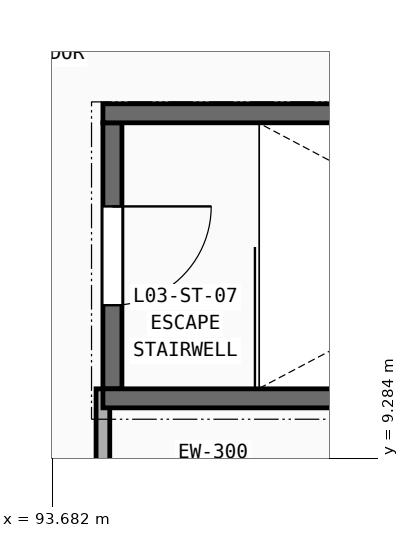
"""IFC4 building model, lengths in metres.
Left out: names, types, materials, properties, quantities, classifications, styles, units other than length and angle.
Written with IfcOpenShell. Run it as: python <this file> out.ifc"""

import sys

from ifc_helpers import new_model, si_unit, direction, frame, frame_2d, origin, place, context, subcontext, project, spatial, rectangle, extrude, element, fill, save


model = new_model("IFC4")
c1 = context("Model", 3, precision=1e-05, world=origin(), true_north=direction((0.0, 1.0)))
c2 = subcontext(c1, "Body", "Model", "MODEL_VIEW")
j1 = project(units=[si_unit("LENGTHUNIT", "METRE"), si_unit("PLANEANGLEUNIT", "RADIAN")], contexts=[c1])
p1 = place(None, origin())
s1 = spatial("IfcSite", under=j1, at=p1, CompositionType="ELEMENT")
p2 = place(p1, origin())
s2 = spatial("IfcBuilding", under=s1, at=p2, CompositionType="ELEMENT")
p3 = place(p2, frame((0.0, 0.0, 13.8)))
s3 = spatial("IfcBuildingStorey", under=s2, at=p3, CompositionType="ELEMENT", Elevation=13.8)
p4 = place(p3, frame((94.35, 8.96, 0.0), z_axis=(0.0, 0.0, 1.0), x_axis=(0.0, 1.0, 0.0)))
e1 = element("IfcWall", 1, at=p4, inside=s3, PredefinedType="PARTITIONING", context=c2, shape_type="SweptSolid", body=[
    extrude(rectangle(XDim=1.24, YDim=0.18, at=frame_2d((0.62, 0.0))), origin(), (0.0, 0.0, 1.0), 3.01),
])
p5 = place(p3, frame((94.475, 13.7, 0.0), z_axis=(0.0, 0.0, 1.0), x_axis=(0.0, -1.0, 0.0)))
e2 = element("IfcWall", 2, at=p5, inside=s3, PredefinedType="SHEAR", context=c2, shape_type="SweptSolid", body=[
    extrude(rectangle(XDim=3.5, YDim=0.25, at=frame_2d((1.75, 0.0))), origin(), (0.0, 0.0, 1.0), 3.9),
])
p6 = place(p5, frame((1.1, 0.0, -0.01)))
e3 = element("IfcOpeningElement", 3, at=p6, cuts=e2, PredefinedType="OPENING", context=c2, shape_type="SweptSolid", body=[
    extrude(rectangle(XDim=1.3, YDim=2.16, at=frame_2d((0.65, 1.08))), frame((0.0, 0.135, 0.0), z_axis=(0.0, -1.0, 0.0), x_axis=(1.0, 0.0, 0.0)), (0.0, 0.0, 1.0), 0.27),
])
for number, where, z_axis, x_axis in (
    (4, (94.35, 10.075, 0.0), (0.0, 0.0, 1.0), (1.0, 0.0, 0.0)),
    (5, (94.35, 13.825, 0.0), (0.0, 0.0, 1.0), (1.0, 0.0, 0.0)),
):
    element("IfcWall", number, at=place(p3, frame(where, z_axis=z_axis, x_axis=x_axis)), inside=s3, PredefinedType="SHEAR", context=c2, shape_type="SweptSolid", body=[
        extrude(rectangle(XDim=8.9, YDim=0.25, at=frame_2d((4.45, 0.0))), origin(), (0.0, 0.0, 1.0), 3.9),
    ])
p7 = place(p6, frame((1.3, 0.0, 0.01), z_axis=(0.0, 0.0, 1.0), x_axis=(-1.0, 0.0, 0.0)))
e6 = element("IfcDoor", 6, at=p7, inside=s3, OperationType="SINGLE_SWING_LEFT", PredefinedType="DOOR", context=c2, shape_type="SweptSolid", body=[
    extrude(rectangle(XDim=1.3, YDim=2.15, at=frame_2d((0.65, 1.075))), frame((0.0, 0.025, 0.0), z_axis=(0.0, -1.0, 0.0), x_axis=(1.0, 0.0, 0.0)), (0.0, 0.0, 1.0), 0.05),
])
fill(e3, e6)
save(model, sys.argv[1])
